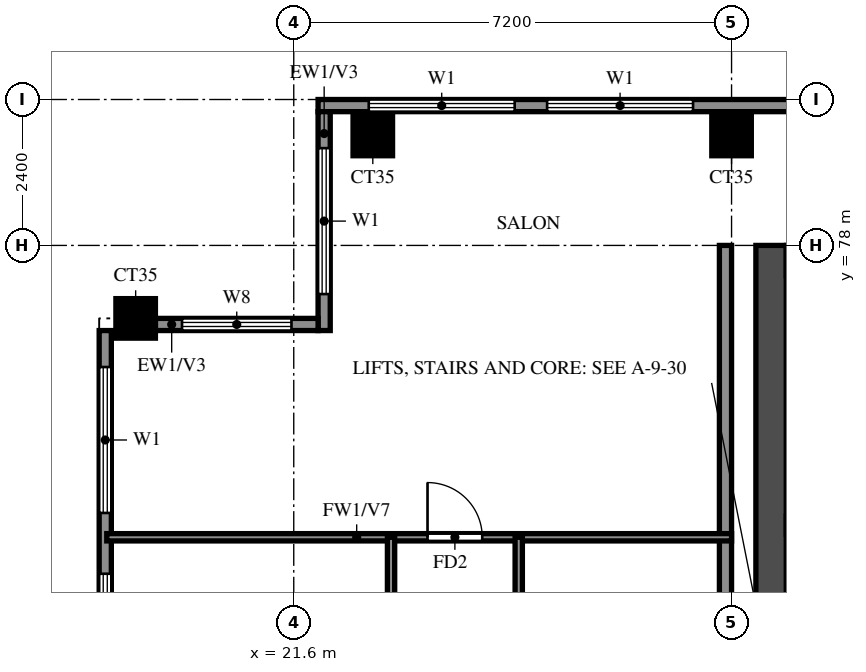
"""IFC4 building model, lengths in metres.
Left out: names, types, materials, properties, quantities, classifications, styles, units other than length and angle.
Written with IfcOpenShell. Run it as: python <this file> out.ifc"""

import sys

from ifc_helpers import new_model, si_unit, direction, frame, frame_2d, origin, origin_2d, place, context, subcontext, project, spatial, rectangle, extrude, source, transform, mapped, element, fill, save


model = new_model("IFC4")
c1 = context("Model", 3, precision=1e-05, world=origin(), true_north=direction((0.0, 1.0)))
c2 = subcontext(c1, "Body", "Model", "MODEL_VIEW")
j1 = project(units=[si_unit("LENGTHUNIT", "METRE"), si_unit("PLANEANGLEUNIT", "RADIAN")], contexts=[c1])
p1 = place(None, origin())
s1 = spatial("IfcSite", under=j1, at=p1, CompositionType="ELEMENT")
p2 = place(p1, origin())
s2 = spatial("IfcBuilding", under=s1, at=p2, CompositionType="ELEMENT")
p3 = place(p2, frame((0.0, 0.0, 232.5)))
s3 = spatial("IfcBuildingStorey", under=s2, at=p3, CompositionType="ELEMENT", Elevation=232.5)
m1 = source(origin(), c2, "Body", "SweptSolid", [
    extrude(rectangle(XDim=0.65, YDim=0.65, at=origin_2d()), origin(), (0.0, 0.0, 1.0), 3.22),
])
for number, where, z_axis, x_axis in (
    (1, (19.0, 76.8, 0.0), (0.0, 0.0, 1.0), (1.0, 0.0, 0.0)),
    (2, (22.9, 79.8, 0.0), (0.0, 0.0, 1.0), (1.0, 0.0, 0.0)),
    (3, (28.8, 79.8, 0.0), (0.0, 0.0, 1.0), (1.0, 0.0, 0.0)),
):
    element("IfcColumn", number, at=place(p3, frame(where, z_axis=z_axis, x_axis=x_axis)), inside=s3, PredefinedType="COLUMN", context=c2, shape_type="MappedRepresentation", body=[
        mapped(m1, transform((0.0, 0.0, 0.0))),
    ])
p4 = place(p3, frame((29.45, 66.15, 0.0), z_axis=(0.0, 0.0, 1.0), x_axis=(0.0, 1.0, 0.0)))
e4 = element("IfcWall", 4, at=p4, inside=s3, PredefinedType="SHEAR", context=c2, shape_type="SweptSolid", body=[
    extrude(rectangle(XDim=11.85, YDim=0.5, at=frame_2d((5.925, 0.0))), origin(), (0.0, 0.0, 1.0), 3.22),
])
p5 = place(p3, frame((78.6, 80.3, 0.0), z_axis=(0.0, 0.0, 1.0), x_axis=(-1.0, 0.0, 0.0)))
e5 = element("IfcWall", 5, at=p5, inside=s3, PredefinedType="SOLIDWALL", context=c2, shape_type="SweptSolid", body=[
    extrude(rectangle(XDim=56.6, YDim=0.2, at=frame_2d((28.3, 0.0))), origin(), (0.0, 0.0, 1.0), 3.22),
])
p6 = place(p5, frame((50.433, 0.0, 0.6)))
e6 = element("IfcOpeningElement", 6, at=p6, cuts=e5, PredefinedType="OPENING", context=c2, shape_type="SweptSolid", body=[
    extrude(rectangle(XDim=2.4, YDim=2.4, at=frame_2d((1.2, 1.2))), frame((0.0, 0.11, 0.0), z_axis=(0.0, -1.0, 0.0), x_axis=(1.0, 0.0, 0.0)), (0.0, 0.0, 1.0), 0.22),
])
p7 = place(p5, frame((53.367, 0.0, 0.6)))
e7 = element("IfcOpeningElement", 7, at=p7, cuts=e5, PredefinedType="OPENING", context=c2, shape_type="SweptSolid", body=[
    extrude(rectangle(XDim=2.4, YDim=2.4, at=frame_2d((1.2, 1.2))), frame((0.0, 0.11, 0.0), z_axis=(0.0, -1.0, 0.0), x_axis=(1.0, 0.0, 0.0)), (0.0, 0.0, 1.0), 0.22),
])
p8 = place(p5, frame((0.767, 0.0, 0.6)))
e8 = element("IfcOpeningElement", 8, at=p8, cuts=e5, PredefinedType="OPENING", context=c2, shape_type="SweptSolid", body=[
    extrude(rectangle(XDim=2.4, YDim=2.4, at=frame_2d((1.2, 1.2))), frame((0.0, 0.11, 0.0), z_axis=(0.0, -1.0, 0.0), x_axis=(1.0, 0.0, 0.0)), (0.0, 0.0, 1.0), 0.22),
])
p9 = place(p5, frame((3.633, 0.0, 0.6)))
e9 = element("IfcOpeningElement", 9, at=p9, cuts=e5, PredefinedType="OPENING", context=c2, shape_type="SweptSolid", body=[
    extrude(rectangle(XDim=2.4, YDim=2.4, at=frame_2d((1.2, 1.2))), frame((0.0, 0.11, 0.0), z_axis=(0.0, -1.0, 0.0), x_axis=(1.0, 0.0, 0.0)), (0.0, 0.0, 1.0), 0.22),
])
p10 = place(p3, frame((22.1, 80.2, 0.0), z_axis=(0.0, 0.0, 1.0), x_axis=(0.0, -1.0, 0.0)))
e10 = element("IfcWall", 10, at=p10, inside=s3, PredefinedType="SOLIDWALL", context=c2, shape_type="SweptSolid", body=[
    extrude(rectangle(XDim=3.6, YDim=0.2, at=frame_2d((1.8, 0.0))), origin(), (0.0, 0.0, 1.0), 3.22),
])
p11 = place(p10, frame((0.6, 0.0, 0.6)))
e11 = element("IfcOpeningElement", 11, at=p11, cuts=e10, PredefinedType="OPENING", context=c2, shape_type="SweptSolid", body=[
    extrude(rectangle(XDim=2.4, YDim=2.4, at=frame_2d((1.2, 1.2))), frame((0.0, 0.11, 0.0), z_axis=(0.0, -1.0, 0.0), x_axis=(1.0, 0.0, 0.0)), (0.0, 0.0, 1.0), 0.22),
])
p12 = place(p3, frame((22.0, 76.7, 0.0), z_axis=(0.0, 0.0, 1.0), x_axis=(-1.0, 0.0, 0.0)))
e12 = element("IfcWall", 12, at=p12, inside=s3, PredefinedType="SOLIDWALL", context=c2, shape_type="SweptSolid", body=[
    extrude(rectangle(XDim=2.675, YDim=0.2, at=frame_2d((1.337, 0.0))), origin(), (0.0, 0.0, 1.0), 3.22),
])
p13 = place(p12, frame((0.438, 0.0, 0.6)))
e13 = element("IfcOpeningElement", 13, at=p13, cuts=e12, PredefinedType="OPENING", context=c2, shape_type="SweptSolid", body=[
    extrude(rectangle(XDim=1.8, YDim=2.4, at=frame_2d((0.9, 1.2))), frame((0.0, 0.11, 0.0), z_axis=(0.0, -1.0, 0.0), x_axis=(1.0, 0.0, 0.0)), (0.0, 0.0, 1.0), 0.22),
])
p14 = place(p3, frame((18.5, 76.6, 0.0), z_axis=(0.0, 0.0, 1.0), x_axis=(0.0, -1.0, 0.0)))
e14 = element("IfcWall", 14, at=p14, inside=s3, PredefinedType="SOLIDWALL", context=c2, shape_type="SweptSolid", body=[
    extrude(rectangle(XDim=33.4, YDim=0.2, at=frame_2d((16.7, 0.0))), origin(), (0.0, 0.0, 1.0), 3.22),
])
p15 = place(p14, frame((15.1, 0.0, 0.0)))
e15 = element("IfcOpeningElement", 15, at=p15, cuts=e14, PredefinedType="OPENING", context=c2, shape_type="SweptSolid", body=[
    extrude(rectangle(XDim=1.8, YDim=2.4, at=frame_2d((0.9, 1.2))), frame((0.0, 0.11, 0.0), z_axis=(0.0, -1.0, 0.0), x_axis=(1.0, 0.0, 0.0)), (0.0, 0.0, 1.0), 0.22),
])
p16 = place(p14, frame((29.7, 0.0, 0.6)))
e16 = element("IfcOpeningElement", 16, at=p16, cuts=e14, PredefinedType="OPENING", context=c2, shape_type="SweptSolid", body=[
    extrude(rectangle(XDim=2.4, YDim=2.4, at=frame_2d((1.2, 1.2))), frame((0.0, 0.11, 0.0), z_axis=(0.0, -1.0, 0.0), x_axis=(1.0, 0.0, 0.0)), (0.0, 0.0, 1.0), 0.22),
])
p17 = place(p14, frame((22.233, 0.0, 0.6)))
e17 = element("IfcOpeningElement", 17, at=p17, cuts=e14, PredefinedType="OPENING", context=c2, shape_type="SweptSolid", body=[
    extrude(rectangle(XDim=2.4, YDim=2.4, at=frame_2d((1.2, 1.2))), frame((0.0, 0.11, 0.0), z_axis=(0.0, -1.0, 0.0), x_axis=(1.0, 0.0, 0.0)), (0.0, 0.0, 1.0), 0.22),
])
p18 = place(p14, frame((25.367, 0.0, 0.6)))
e18 = element("IfcOpeningElement", 18, at=p18, cuts=e14, PredefinedType="OPENING", context=c2, shape_type="SweptSolid", body=[
    extrude(rectangle(XDim=2.4, YDim=2.4, at=frame_2d((1.2, 1.2))), frame((0.0, 0.11, 0.0), z_axis=(0.0, -1.0, 0.0), x_axis=(1.0, 0.0, 0.0)), (0.0, 0.0, 1.0), 0.22),
])
p19 = place(p14, frame((19.3, 0.0, 0.6)))
e19 = element("IfcOpeningElement", 19, at=p19, cuts=e14, PredefinedType="OPENING", context=c2, shape_type="SweptSolid", body=[
    extrude(rectangle(XDim=1.8, YDim=2.4, at=frame_2d((0.9, 1.2))), frame((0.0, 0.11, 0.0), z_axis=(0.0, -1.0, 0.0), x_axis=(1.0, 0.0, 0.0)), (0.0, 0.0, 1.0), 0.22),
])
p20 = place(p14, frame((10.75, 0.0, 0.6)))
e20 = element("IfcOpeningElement", 20, at=p20, cuts=e14, PredefinedType="OPENING", context=c2, shape_type="SweptSolid", body=[
    extrude(rectangle(XDim=0.9, YDim=2.4, at=frame_2d((0.45, 1.2))), frame((0.0, 0.11, 0.0), z_axis=(0.0, -1.0, 0.0), x_axis=(1.0, 0.0, 0.0)), (0.0, 0.0, 1.0), 0.22),
])
p21 = place(p14, frame((12.7, 0.0, 0.6)))
e21 = element("IfcOpeningElement", 21, at=p21, cuts=e14, PredefinedType="OPENING", context=c2, shape_type="SweptSolid", body=[
    extrude(rectangle(XDim=1.2, YDim=2.4, at=frame_2d((0.6, 1.2))), frame((0.0, 0.11, 0.0), z_axis=(0.0, -1.0, 0.0), x_axis=(1.0, 0.0, 0.0)), (0.0, 0.0, 1.0), 0.22),
])
p22 = place(p14, frame((7.6, 0.0, 0.6)))
e22 = element("IfcOpeningElement", 22, at=p22, cuts=e14, PredefinedType="OPENING", context=c2, shape_type="SweptSolid", body=[
    extrude(rectangle(XDim=2.4, YDim=2.4, at=frame_2d((1.2, 1.2))), frame((0.0, 0.11, 0.0), z_axis=(0.0, -1.0, 0.0), x_axis=(1.0, 0.0, 0.0)), (0.0, 0.0, 1.0), 0.22),
])
p23 = place(p14, frame((4.0, 0.0, 0.6)))
e23 = element("IfcOpeningElement", 23, at=p23, cuts=e14, PredefinedType="OPENING", context=c2, shape_type="SweptSolid", body=[
    extrude(rectangle(XDim=2.4, YDim=2.4, at=frame_2d((1.2, 1.2))), frame((0.0, 0.11, 0.0), z_axis=(0.0, -1.0, 0.0), x_axis=(1.0, 0.0, 0.0)), (0.0, 0.0, 1.0), 0.22),
])
p24 = place(p14, frame((0.6, 0.0, 0.6)))
e24 = element("IfcOpeningElement", 24, at=p24, cuts=e14, PredefinedType="OPENING", context=c2, shape_type="SweptSolid", body=[
    extrude(rectangle(XDim=2.4, YDim=2.4, at=frame_2d((1.2, 1.2))), frame((0.0, 0.11, 0.0), z_axis=(0.0, -1.0, 0.0), x_axis=(1.0, 0.0, 0.0)), (0.0, 0.0, 1.0), 0.22),
])
p25 = place(p3, frame((28.7, 62.4, 0.0), z_axis=(0.0, 0.0, 1.0), x_axis=(0.0, 1.0, 0.0)))
e25 = element("IfcWall", 25, at=p25, inside=s3, PredefinedType="SOLIDWALL", context=c2, shape_type="SweptSolid", body=[
    extrude(rectangle(XDim=15.6, YDim=0.2, at=frame_2d((7.8, 0.0))), origin(), (0.0, 0.0, 1.0), 3.22),
])
p26 = place(p3, frame((18.525, 73.2, 0.0), z_axis=(0.0, 0.0, 1.0), x_axis=(1.0, 0.0, 0.0)))
e26 = element("IfcWall", 26, at=p26, inside=s3, PredefinedType="PARTITIONING", context=c2, shape_type="SweptSolid", body=[
    extrude(rectangle(XDim=10.275, YDim=0.12, at=frame_2d((5.138, 0.0))), origin(), (0.0, 0.0, 1.0), 2.32),
])
p27 = place(p26, frame((5.275, 0.0, 0.0)))
e27 = element("IfcOpeningElement", 27, at=p27, cuts=e26, PredefinedType="OPENING", context=c2, shape_type="SweptSolid", body=[
    extrude(rectangle(XDim=0.9, YDim=2.1, at=frame_2d((0.45, 1.05))), frame((0.0, 0.07, 0.0), z_axis=(0.0, -1.0, 0.0), x_axis=(1.0, 0.0, 0.0)), (0.0, 0.0, 1.0), 0.14),
])
p28 = place(p3, frame((23.2, 48.0, 0.0), z_axis=(0.0, 0.0, 1.0), x_axis=(0.0, 1.0, 0.0)))
e28 = element("IfcWall", 28, at=p28, inside=s3, PredefinedType="PARTITIONING", context=c2, shape_type="SweptSolid", body=[
    extrude(rectangle(XDim=25.2, YDim=0.12, at=frame_2d((12.6, 0.0))), origin(), (0.0, 0.0, 1.0), 3.22),
])
p29 = place(p28, frame((2.85, 0.0, 0.0)))
e29 = element("IfcOpeningElement", 29, at=p29, cuts=e28, PredefinedType="OPENING", context=c2, shape_type="SweptSolid", body=[
    extrude(rectangle(XDim=1.5, YDim=2.1, at=frame_2d((0.75, 1.05))), frame((0.0, 0.07, 0.0), z_axis=(0.0, -1.0, 0.0), x_axis=(1.0, 0.0, 0.0)), (0.0, 0.0, 1.0), 0.14),
])
p30 = place(p28, frame((8.55, 0.0, 0.0)))
e30 = element("IfcOpeningElement", 30, at=p30, cuts=e28, PredefinedType="OPENING", context=c2, shape_type="SweptSolid", body=[
    extrude(rectangle(XDim=0.9, YDim=2.1, at=frame_2d((0.45, 1.05))), frame((0.0, 0.07, 0.0), z_axis=(0.0, -1.0, 0.0), x_axis=(1.0, 0.0, 0.0)), (0.0, 0.0, 1.0), 0.14),
])
p31 = place(p28, frame((12.15, 0.0, 0.0)))
e31 = element("IfcOpeningElement", 31, at=p31, cuts=e28, PredefinedType="OPENING", context=c2, shape_type="SweptSolid", body=[
    extrude(rectangle(XDim=0.9, YDim=2.1, at=frame_2d((0.45, 1.05))), frame((0.0, 0.07, 0.0), z_axis=(0.0, -1.0, 0.0), x_axis=(1.0, 0.0, 0.0)), (0.0, 0.0, 1.0), 0.14),
])
p32 = place(p28, frame((15.75, 0.0, 0.0)))
e32 = element("IfcOpeningElement", 32, at=p32, cuts=e28, PredefinedType="OPENING", context=c2, shape_type="SweptSolid", body=[
    extrude(rectangle(XDim=0.9, YDim=2.1, at=frame_2d((0.45, 1.05))), frame((0.0, 0.07, 0.0), z_axis=(0.0, -1.0, 0.0), x_axis=(1.0, 0.0, 0.0)), (0.0, 0.0, 1.0), 0.14),
])
p33 = place(p28, frame((19.35, 0.0, 0.0)))
e33 = element("IfcOpeningElement", 33, at=p33, cuts=e28, PredefinedType="OPENING", context=c2, shape_type="SweptSolid", body=[
    extrude(rectangle(XDim=0.9, YDim=2.1, at=frame_2d((0.45, 1.05))), frame((0.0, 0.07, 0.0), z_axis=(0.0, -1.0, 0.0), x_axis=(1.0, 0.0, 0.0)), (0.0, 0.0, 1.0), 0.14),
])
p34 = place(p28, frame((22.95, 0.0, 0.0)))
e34 = element("IfcOpeningElement", 34, at=p34, cuts=e28, PredefinedType="OPENING", context=c2, shape_type="SweptSolid", body=[
    extrude(rectangle(XDim=0.9, YDim=2.1, at=frame_2d((0.45, 1.05))), frame((0.0, 0.07, 0.0), z_axis=(0.0, -1.0, 0.0), x_axis=(1.0, 0.0, 0.0)), (0.0, 0.0, 1.0), 0.14),
])
p35 = place(p3, frame((25.3, 61.2, 0.0), z_axis=(0.0, 0.0, 1.0), x_axis=(0.0, 1.0, 0.0)))
e35 = element("IfcWall", 35, at=p35, inside=s3, PredefinedType="PARTITIONING", context=c2, shape_type="SweptSolid", body=[
    extrude(rectangle(XDim=12.0, YDim=0.12, at=frame_2d((6.0, 0.0))), origin(), (0.0, 0.0, 1.0), 3.22),
])
p36 = place(p35, frame((4.45, 0.0, 0.0)))
e36 = element("IfcOpeningElement", 36, at=p36, cuts=e35, PredefinedType="OPENING", context=c2, shape_type="SweptSolid", body=[
    extrude(rectangle(XDim=0.9, YDim=2.1, at=frame_2d((0.45, 1.05))), frame((0.0, 0.07, 0.0), z_axis=(0.0, -1.0, 0.0), x_axis=(1.0, 0.0, 0.0)), (0.0, 0.0, 1.0), 0.14),
])
p37 = place(p35, frame((9.225, 0.0, 0.0)))
e37 = element("IfcOpeningElement", 37, at=p37, cuts=e35, PredefinedType="OPENING", context=c2, shape_type="SweptSolid", body=[
    extrude(rectangle(XDim=0.9, YDim=2.1, at=frame_2d((0.45, 1.05))), frame((0.0, 0.07, 0.0), z_axis=(0.0, -1.0, 0.0), x_axis=(1.0, 0.0, 0.0)), (0.0, 0.0, 1.0), 0.14),
])
p38 = place(p6, origin())
e38 = element("IfcWindow", 38, at=p38, inside=s3, PartitioningType="DOUBLE_PANEL_VERTICAL", PredefinedType="WINDOW", context=c2, shape_type="SweptSolid", body=[
    extrude(rectangle(XDim=2.4, YDim=2.4, at=frame_2d((1.2, 1.2))), frame((0.0, 0.03, 0.0), z_axis=(0.0, -1.0, 0.0), x_axis=(1.0, 0.0, 0.0)), (0.0, 0.0, 1.0), 0.06),
])
fill(e6, e38)
p39 = place(p7, origin())
e39 = element("IfcWindow", 39, at=p39, inside=s3, PartitioningType="DOUBLE_PANEL_VERTICAL", PredefinedType="WINDOW", context=c2, shape_type="SweptSolid", body=[
    extrude(rectangle(XDim=2.4, YDim=2.4, at=frame_2d((1.2, 1.2))), frame((0.0, 0.03, 0.0), z_axis=(0.0, -1.0, 0.0), x_axis=(1.0, 0.0, 0.0)), (0.0, 0.0, 1.0), 0.06),
])
fill(e7, e39)
p40 = place(p11, origin())
e40 = element("IfcWindow", 40, at=p40, inside=s3, PartitioningType="DOUBLE_PANEL_VERTICAL", PredefinedType="WINDOW", context=c2, shape_type="SweptSolid", body=[
    extrude(rectangle(XDim=2.4, YDim=2.4, at=frame_2d((1.2, 1.2))), frame((0.0, 0.03, 0.0), z_axis=(0.0, -1.0, 0.0), x_axis=(1.0, 0.0, 0.0)), (0.0, 0.0, 1.0), 0.06),
])
fill(e11, e40)
p41 = place(p13, origin())
e41 = element("IfcWindow", 41, at=p41, inside=s3, PartitioningType="DOUBLE_PANEL_VERTICAL", PredefinedType="WINDOW", context=c2, shape_type="SweptSolid", body=[
    extrude(rectangle(XDim=1.8, YDim=2.4, at=frame_2d((0.9, 1.2))), frame((0.0, 0.03, 0.0), z_axis=(0.0, -1.0, 0.0), x_axis=(1.0, 0.0, 0.0)), (0.0, 0.0, 1.0), 0.06),
])
fill(e13, e41)
p42 = place(p23, origin())
e42 = element("IfcWindow", 42, at=p42, inside=s3, PartitioningType="DOUBLE_PANEL_VERTICAL", PredefinedType="WINDOW", context=c2, shape_type="SweptSolid", body=[
    extrude(rectangle(XDim=2.4, YDim=2.4, at=frame_2d((1.2, 1.2))), frame((0.0, 0.03, 0.0), z_axis=(0.0, -1.0, 0.0), x_axis=(1.0, 0.0, 0.0)), (0.0, 0.0, 1.0), 0.06),
])
fill(e23, e42)
p43 = place(p24, origin())
e43 = element("IfcWindow", 43, at=p43, inside=s3, PartitioningType="DOUBLE_PANEL_VERTICAL", PredefinedType="WINDOW", context=c2, shape_type="SweptSolid", body=[
    extrude(rectangle(XDim=2.4, YDim=2.4, at=frame_2d((1.2, 1.2))), frame((0.0, 0.03, 0.0), z_axis=(0.0, -1.0, 0.0), x_axis=(1.0, 0.0, 0.0)), (0.0, 0.0, 1.0), 0.06),
])
fill(e24, e43)
p44 = place(p27, origin())
e44 = element("IfcDoor", 44, at=p44, inside=s3, OperationType="SINGLE_SWING_RIGHT", PredefinedType="DOOR", context=c2, shape_type="SweptSolid", body=[
    extrude(rectangle(XDim=0.9, YDim=2.1, at=frame_2d((0.45, 1.05))), frame((0.0, 0.025, 0.0), z_axis=(0.0, -1.0, 0.0), x_axis=(1.0, 0.0, 0.0)), (0.0, 0.0, 1.0), 0.05),
])
fill(e27, e44)
save(model, sys.argv[1])
